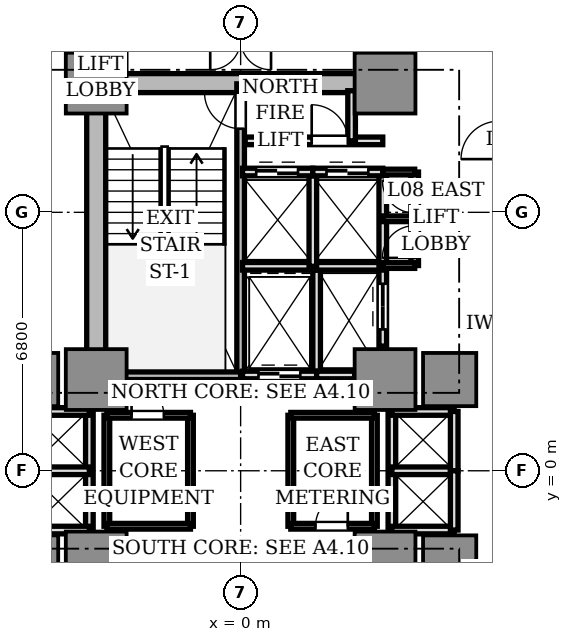
"""IFC4 building model, lengths in metres.
Left out: names, types, materials, properties, quantities, classifications, styles, units other than length and angle.
Written with IfcOpenShell. Run it as: python <this file> out.ifc"""

import sys

from ifc_helpers import new_model, si_unit, direction, frame, frame_2d, origin, origin_2d, place, context, subcontext, project, spatial, rectangle, extrude, source, transform, mapped, element, fill, save


model = new_model("IFC4")
c1 = context("Model", 3, precision=1e-05, world=origin(), true_north=direction((0.0, 1.0)))
c2 = subcontext(c1, "Body", "Model", "MODEL_VIEW")
j1 = project(units=[si_unit("LENGTHUNIT", "METRE"), si_unit("PLANEANGLEUNIT", "RADIAN")], contexts=[c1])
p1 = place(None, origin())
s1 = spatial("IfcSite", under=j1, at=p1, CompositionType="ELEMENT")
p2 = place(p1, origin())
s2 = spatial("IfcBuilding", under=s1, at=p2, CompositionType="ELEMENT")
p3 = place(p2, frame((0.0, 0.0, 33.15)))
s3 = spatial("IfcBuildingStorey", under=s2, at=p3, CompositionType="ELEMENT", Elevation=33.15)
p4 = place(p3, frame((-3.55, 10.2, 0.0), z_axis=(0.0, 0.0, 1.0), x_axis=(1.0, 0.0, 0.0)))
e1 = element("IfcWall", 1, at=p4, inside=s3, PredefinedType="SHEAR", context=c2, shape_type="SweptSolid", body=[
    extrude(rectangle(XDim=7.1, YDim=0.5, at=frame_2d((3.55, 0.0))), origin(), (0.0, 0.0, 1.0), 3.11),
])
p5 = place(p3, frame((-3.8, 2.85, 0.0), z_axis=(0.0, 0.0, 1.0), x_axis=(0.0, 1.0, 0.0)))
e2 = element("IfcWall", 2, at=p5, inside=s3, PredefinedType="SHEAR", context=c2, shape_type="SweptSolid", body=[
    extrude(rectangle(XDim=6.9, YDim=0.5, at=frame_2d((3.45, 0.0))), origin(), (0.0, 0.0, 1.0), 3.11),
])
m1 = source(origin(), c2, "Body", "SweptSolid", [
    extrude(rectangle(XDim=1.6, YDim=1.6, at=origin_2d()), origin(), (0.0, 0.0, 1.0), 3.11),
])
for number, where, z_axis, x_axis in (
    (3, (-3.8, 2.4, 0.0), (0.0, 0.0, 1.0), (1.0, 0.0, 0.0)),
    (4, (3.8, 2.4, 0.0), (0.0, 0.0, 1.0), (1.0, 0.0, 0.0)),
    (5, (-3.8, 10.2, 0.0), (0.0, 0.0, 1.0), (1.0, 0.0, 0.0)),
    (6, (3.8, 10.2, 0.0), (0.0, 0.0, 1.0), (1.0, 0.0, 0.0)),
    (7, (-3.8, -2.4, 0.0), (0.0, 0.0, 1.0), (1.0, 0.0, 0.0)),
    (8, (3.8, -2.4, 0.0), (0.0, 0.0, 1.0), (1.0, 0.0, 0.0)),
):
    element("IfcColumn", number, at=place(p3, frame(where, z_axis=z_axis, x_axis=x_axis)), inside=s3, PredefinedType="COLUMN", context=c2, shape_type="MappedRepresentation", body=[
        mapped(m1, transform((0.0, 0.0, 0.0), scale=1.0)),
    ])
m2 = source(origin(), c2, "Body", "SweptSolid", [
    extrude(rectangle(XDim=1.4, YDim=1.4, at=origin_2d()), origin(), (0.0, 0.0, 1.0), 3.11),
])
for number, where, z_axis, x_axis in (
    (9, (5.5, 2.4, 0.0), (0.0, 0.0, 1.0), (1.0, 0.0, 0.0)),
    (10, (-5.5, 2.4, 0.0), (0.0, 0.0, 1.0), (1.0, 0.0, 0.0)),
    (11, (5.5, -2.4, 0.0), (0.0, 0.0, 1.0), (1.0, 0.0, 0.0)),
    (12, (-5.5, -2.4, 0.0), (0.0, 0.0, 1.0), (1.0, 0.0, 0.0)),
):
    element("IfcColumn", number, at=place(p3, frame(where, z_axis=z_axis, x_axis=x_axis)), inside=s3, PredefinedType="COLUMN", context=c2, shape_type="MappedRepresentation", body=[
        mapped(m2, transform((0.0, 0.0, 0.0), scale=1.0)),
    ])
p6 = place(p3, frame((0.0, 2.5, 0.0), z_axis=(0.0, 0.0, 1.0), x_axis=(0.0, 1.0, 0.0)))
e13 = element("IfcWall", 13, at=p6, inside=s3, PredefinedType="SOLIDWALL", context=c2, shape_type="SweptSolid", body=[
    extrude(rectangle(XDim=7.68, YDim=0.2, at=frame_2d((3.84, 0.0))), origin(), (0.0, 0.0, 1.0), 3.11),
])
p7 = place(p6, frame((6.5, 0.0, 0.0)))
e14 = element("IfcOpeningElement", 14, at=p7, cuts=e13, PredefinedType="OPENING", context=c2, shape_type="SweptSolid", body=[
    extrude(rectangle(XDim=0.95, YDim=2.15, at=frame_2d((0.475, 1.075))), frame((0.0, 0.11, 0.0), z_axis=(0.0, -1.0, 0.0), x_axis=(1.0, 0.0, 0.0)), (0.0, 0.0, 1.0), 0.22),
])
p8 = place(p3, frame((-3.72, 2.5, 0.0), z_axis=(0.0, 0.0, 1.0), x_axis=(1.0, 0.0, 0.0)))
e15 = element("IfcWall", 15, at=p8, inside=s3, PredefinedType="SOLIDWALL", context=c2, shape_type="SweptSolid", body=[
    extrude(rectangle(XDim=3.72, YDim=0.2, at=frame_2d((1.86, 0.0))), origin(), (0.0, 0.0, 1.0), 3.11),
])
p9 = place(p3, frame((2.0, 2.5, 0.0), z_axis=(0.0, 0.0, 1.0), x_axis=(0.0, 1.0, 0.0)))
e16 = element("IfcWall", 16, at=p9, inside=s3, PredefinedType="SOLIDWALL", context=c2, shape_type="SweptSolid", body=[
    extrude(rectangle(XDim=2.78, YDim=0.2, at=frame_2d((1.39, 0.0))), origin(), (0.0, 0.0, 1.0), 2.66),
])
p10 = place(p3, frame((0.05, 2.52, 0.0), z_axis=(0.0, 0.0, 1.0), x_axis=(1.0, 0.0, 0.0)))
e17 = element("IfcWall", 17, at=p10, inside=s3, PredefinedType="SOLIDWALL", context=c2, shape_type="SweptSolid", body=[
    extrude(rectangle(XDim=1.95, YDim=0.2, at=frame_2d((0.975, 0.0))), origin(), (0.0, 0.0, 1.0), 2.66),
])
p11 = place(p10, frame((0.42, 0.0, 0.0)))
e18 = element("IfcOpeningElement", 18, at=p11, cuts=e17, PredefinedType="OPENING", context=c2, shape_type="SweptSolid", body=[
    extrude(rectangle(XDim=1.1, YDim=2.2, at=frame_2d((0.55, 1.1))), frame((0.0, 0.11, 0.0), z_axis=(0.0, -1.0, 0.0), x_axis=(1.0, 0.0, 0.0)), (0.0, 0.0, 1.0), 0.22),
])
p12 = place(p3, frame((2.0, 2.52, 0.0), z_axis=(0.0, 0.0, 1.0), x_axis=(1.0, 0.0, 0.0)))
e19 = element("IfcWall", 19, at=p12, inside=s3, PredefinedType="SOLIDWALL", context=c2, shape_type="SweptSolid", body=[
    extrude(rectangle(XDim=1.0, YDim=0.2, at=frame_2d((0.5, 0.0))), origin(), (0.0, 0.0, 1.0), 2.66),
])
p13 = place(p3, frame((3.74, 3.28, 0.0), z_axis=(0.0, 0.0, 1.0), x_axis=(0.0, 1.0, 0.0)))
e20 = element("IfcWall", 20, at=p13, inside=s3, PredefinedType="SOLIDWALL", context=c2, shape_type="SweptSolid", body=[
    extrude(rectangle(XDim=2.08, YDim=0.2, at=frame_2d((1.04, 0.0))), origin(), (0.0, 0.0, 1.0), 2.66),
])
p14 = place(p13, frame((0.44, 0.0, 0.0)))
e21 = element("IfcOpeningElement", 21, at=p14, cuts=e20, PredefinedType="OPENING", context=c2, shape_type="SweptSolid", body=[
    extrude(rectangle(XDim=1.2, YDim=2.2, at=frame_2d((0.6, 1.1))), frame((0.0, 0.11, 0.0), z_axis=(0.0, -1.0, 0.0), x_axis=(1.0, 0.0, 0.0)), (0.0, 0.0, 1.0), 0.22),
])
p15 = place(p3, frame((0.05, 5.38, 0.0), z_axis=(0.0, 0.0, 1.0), x_axis=(1.0, 0.0, 0.0)))
e22 = element("IfcWall", 22, at=p15, inside=s3, PredefinedType="SOLIDWALL", context=c2, shape_type="SweptSolid", body=[
    extrude(rectangle(XDim=3.69, YDim=0.2, at=frame_2d((1.845, 0.0))), origin(), (0.0, 0.0, 1.0), 2.66),
])
p16 = place(p3, frame((1.9, 5.38, 0.0), z_axis=(0.0, 0.0, 1.0), x_axis=(0.0, 1.0, 0.0)))
e23 = element("IfcWall", 23, at=p16, inside=s3, PredefinedType="SOLIDWALL", context=c2, shape_type="SweptSolid", body=[
    extrude(rectangle(XDim=2.48, YDim=0.2, at=frame_2d((1.24, 0.0))), origin(), (0.0, 0.0, 1.0), 2.66),
])
p17 = place(p3, frame((0.05, 7.86, 0.0), z_axis=(0.0, 0.0, 1.0), x_axis=(1.0, 0.0, 0.0)))
e24 = element("IfcWall", 24, at=p17, inside=s3, PredefinedType="SOLIDWALL", context=c2, shape_type="SweptSolid", body=[
    extrude(rectangle(XDim=1.85, YDim=0.2, at=frame_2d((0.925, 0.0))), origin(), (0.0, 0.0, 1.0), 2.66),
])
p18 = place(p17, frame((0.36, 0.0, 0.0)))
e25 = element("IfcOpeningElement", 25, at=p18, cuts=e24, PredefinedType="OPENING", context=c2, shape_type="SweptSolid", body=[
    extrude(rectangle(XDim=1.1, YDim=2.2, at=frame_2d((0.55, 1.1))), frame((0.0, 0.11, 0.0), z_axis=(0.0, -1.0, 0.0), x_axis=(1.0, 0.0, 0.0)), (0.0, 0.0, 1.0), 0.22),
])
p19 = place(p3, frame((3.74, 5.38, 0.0), z_axis=(0.0, 0.0, 1.0), x_axis=(0.0, 1.0, 0.0)))
e26 = element("IfcWall", 26, at=p19, inside=s3, PredefinedType="SOLIDWALL", context=c2, shape_type="SweptSolid", body=[
    extrude(rectangle(XDim=2.48, YDim=0.2, at=frame_2d((1.24, 0.0))), origin(), (0.0, 0.0, 1.0), 2.66),
])
p20 = place(p3, frame((1.9, 7.86, 0.0), z_axis=(0.0, 0.0, 1.0), x_axis=(1.0, 0.0, 0.0)))
e27 = element("IfcWall", 27, at=p20, inside=s3, PredefinedType="SOLIDWALL", context=c2, shape_type="SweptSolid", body=[
    extrude(rectangle(XDim=1.84, YDim=0.2, at=frame_2d((0.92, 0.0))), origin(), (0.0, 0.0, 1.0), 2.66),
])
p21 = place(p20, frame((0.36, 0.0, 0.0)))
e28 = element("IfcOpeningElement", 28, at=p21, cuts=e27, PredefinedType="OPENING", context=c2, shape_type="SweptSolid", body=[
    extrude(rectangle(XDim=1.1, YDim=2.2, at=frame_2d((0.55, 1.1))), frame((0.0, 0.11, 0.0), z_axis=(0.0, -1.0, 0.0), x_axis=(1.0, 0.0, 0.0)), (0.0, 0.0, 1.0), 0.22),
])
p22 = place(p3, frame((3.98, -1.56, 0.0), z_axis=(0.0, 0.0, 1.0), x_axis=(0.0, 1.0, 0.0)))
e29 = element("IfcWall", 29, at=p22, inside=s3, PredefinedType="SOLIDWALL", context=c2, shape_type="SweptSolid", body=[
    extrude(rectangle(XDim=3.12, YDim=0.2, at=frame_2d((1.56, 0.0))), origin(), (0.0, 0.0, 1.0), 2.18),
])
for number, where, z_axis, x_axis in (
    (30, (3.98, 1.56, 0.0), (0.0, 0.0, 1.0), (1.0, 0.0, 0.0)),
    (31, (3.98, -1.56, 0.0), (0.0, 0.0, 1.0), (1.0, 0.0, 0.0)),
    (32, (3.98, 0.0, 0.0), (0.0, 0.0, 1.0), (1.0, 0.0, 0.0)),
):
    element("IfcWall", number, at=place(p3, frame(where, z_axis=z_axis, x_axis=x_axis)), inside=s3, PredefinedType="SOLIDWALL", context=c2, shape_type="SweptSolid", body=[
        extrude(rectangle(XDim=1.64, YDim=0.2, at=frame_2d((0.82, 0.0))), origin(), (0.0, 0.0, 1.0), 2.66),
    ])
for number, where, z_axis, x_axis in (
    (33, (5.62, 0.0, 0.0), (0.0, 0.0, 1.0), (0.0, 1.0, 0.0)),
    (34, (5.62, -1.56, 0.0), (0.0, 0.0, 1.0), (0.0, 1.0, 0.0)),
):
    element("IfcWall", number, at=place(p3, frame(where, z_axis=z_axis, x_axis=x_axis)), inside=s3, PredefinedType="SOLIDWALL", context=c2, shape_type="SweptSolid", body=[
        extrude(rectangle(XDim=1.56, YDim=0.2, at=frame_2d((0.78, 0.0))), origin(), (0.0, 0.0, 1.0), 2.66),
    ])
p23 = place(p3, frame((-3.98, -1.56, 0.0), z_axis=(0.0, 0.0, 1.0), x_axis=(0.0, 1.0, 0.0)))
e35 = element("IfcWall", 35, at=p23, inside=s3, PredefinedType="SOLIDWALL", context=c2, shape_type="SweptSolid", body=[
    extrude(rectangle(XDim=3.12, YDim=0.2, at=frame_2d((1.56, 0.0))), origin(), (0.0, 0.0, 1.0), 2.18),
])
for number, where, z_axis, x_axis in (
    (36, (-5.62, 1.56, 0.0), (0.0, 0.0, 1.0), (1.0, 0.0, 0.0)),
    (37, (-5.62, -1.56, 0.0), (0.0, 0.0, 1.0), (1.0, 0.0, 0.0)),
    (38, (-5.62, 0.0, 0.0), (0.0, 0.0, 1.0), (1.0, 0.0, 0.0)),
):
    element("IfcWall", number, at=place(p3, frame(where, z_axis=z_axis, x_axis=x_axis)), inside=s3, PredefinedType="SOLIDWALL", context=c2, shape_type="SweptSolid", body=[
        extrude(rectangle(XDim=1.64, YDim=0.2, at=frame_2d((0.82, 0.0))), origin(), (0.0, 0.0, 1.0), 2.66),
    ])
p24 = place(p3, frame((0.12, 8.68, 0.0), z_axis=(0.0, 0.0, 1.0), x_axis=(1.0, 0.0, 0.0)))
e39 = element("IfcWall", 39, at=p24, inside=s3, PredefinedType="SOLIDWALL", context=c2, shape_type="SweptSolid", body=[
    extrude(rectangle(XDim=3.62, YDim=0.2, at=frame_2d((1.81, 0.0))), origin(), (0.0, 0.0, 1.0), 2.66),
])
p25 = place(p24, frame((1.75, 0.0, 0.0)))
e40 = element("IfcOpeningElement", 40, at=p25, cuts=e39, PredefinedType="OPENING", context=c2, shape_type="SweptSolid", body=[
    extrude(rectangle(XDim=0.95, YDim=2.15, at=frame_2d((0.475, 1.075))), frame((0.0, 0.11, 0.0), z_axis=(0.0, -1.0, 0.0), x_axis=(1.0, 0.0, 0.0)), (0.0, 0.0, 1.0), 0.22),
])
p26 = place(p3, frame((2.92, 8.68, 0.0), z_axis=(0.0, 0.0, 1.0), x_axis=(0.0, 1.0, 0.0)))
e41 = element("IfcWall", 41, at=p26, inside=s3, PredefinedType="SOLIDWALL", context=c2, shape_type="SweptSolid", body=[
    extrude(rectangle(XDim=1.32, YDim=0.2, at=frame_2d((0.66, 0.0))), origin(), (0.0, 0.0, 1.0), 2.66),
])
p27 = place(p3, frame((4.58, 5.4, 0.0), z_axis=(0.0, 0.0, 1.0), x_axis=(0.0, 1.0, 0.0)))
e42 = element("IfcWall", 42, at=p27, inside=s3, PredefinedType="SOLIDWALL", context=c2, shape_type="SweptSolid", body=[
    extrude(rectangle(XDim=2.46, YDim=0.2, at=frame_2d((1.23, 0.0))), origin(), (0.0, 0.0, 1.0), 2.66),
])
p28 = place(p27, frame((0.2, 0.0, 0.0)))
e43 = element("IfcOpeningElement", 43, at=p28, cuts=e42, PredefinedType="OPENING", context=c2, shape_type="SweptSolid", body=[
    extrude(rectangle(XDim=0.85, YDim=2.1, at=frame_2d((0.425, 1.05))), frame((0.0, 0.11, 0.0), z_axis=(0.0, -1.0, 0.0), x_axis=(1.0, 0.0, 0.0)), (0.0, 0.0, 1.0), 0.22),
])
p29 = place(p27, frame((1.38, 0.0, 0.0)))
e44 = element("IfcOpeningElement", 44, at=p29, cuts=e42, PredefinedType="OPENING", context=c2, shape_type="SweptSolid", body=[
    extrude(rectangle(XDim=0.85, YDim=2.1, at=frame_2d((0.425, 1.05))), frame((0.0, 0.11, 0.0), z_axis=(0.0, -1.0, 0.0), x_axis=(1.0, 0.0, 0.0)), (0.0, 0.0, 1.0), 0.22),
])
for number, where, z_axis, x_axis in (
    (45, (3.74, 5.4, 0.0), (0.0, 0.0, 1.0), (1.0, 0.0, 0.0)),
    (46, (3.74, 7.86, 0.0), (0.0, 0.0, 1.0), (1.0, 0.0, 0.0)),
    (47, (3.74, 6.63, 0.0), (0.0, 0.0, 1.0), (1.0, 0.0, 0.0)),
):
    element("IfcWall", number, at=place(p3, frame(where, z_axis=z_axis, x_axis=x_axis)), inside=s3, PredefinedType="PARTITIONING", context=c2, shape_type="SweptSolid", body=[
        extrude(rectangle(XDim=0.84, YDim=0.15, at=frame_2d((0.42, 0.0))), origin(), (0.0, 0.0, 1.0), 2.66),
    ])
p30 = place(p3, frame((-1.32, -1.46, 0.0), z_axis=(0.0, 0.0, 1.0), x_axis=(0.0, 1.0, 0.0)))
e48 = element("IfcWall", 48, at=p30, inside=s3, PredefinedType="PARTITIONING", context=c2, shape_type="SweptSolid", body=[
    extrude(rectangle(XDim=2.92, YDim=0.15, at=frame_2d((1.46, 0.0))), origin(), (0.0, 0.0, 1.0), 2.66),
])
p31 = place(p3, frame((-3.52, -1.46, 0.0), z_axis=(0.0, 0.0, 1.0), x_axis=(0.0, 1.0, 0.0)))
e49 = element("IfcWall", 49, at=p31, inside=s3, PredefinedType="PARTITIONING", context=c2, shape_type="SweptSolid", body=[
    extrude(rectangle(XDim=2.92, YDim=0.15, at=frame_2d((1.46, 0.0))), origin(), (0.0, 0.0, 1.0), 2.18),
])
p32 = place(p3, frame((-3.52, 1.46, 0.0), z_axis=(0.0, 0.0, 1.0), x_axis=(1.0, 0.0, 0.0)))
e50 = element("IfcWall", 50, at=p32, inside=s3, PredefinedType="PARTITIONING", context=c2, shape_type="SweptSolid", body=[
    extrude(rectangle(XDim=2.2, YDim=0.15, at=frame_2d((1.1, 0.0))), origin(), (0.0, 0.0, 1.0), 2.66),
])
p33 = place(p32, frame((0.65, 0.0, 0.0)))
e51 = element("IfcOpeningElement", 51, at=p33, cuts=e50, PredefinedType="OPENING", context=c2, shape_type="SweptSolid", body=[
    extrude(rectangle(XDim=0.85, YDim=2.1, at=frame_2d((0.425, 1.05))), frame((0.0, 0.085, 0.0), z_axis=(0.0, -1.0, 0.0), x_axis=(1.0, 0.0, 0.0)), (0.0, 0.0, 1.0), 0.17),
])
p34 = place(p3, frame((-3.52, -1.46, 0.0), z_axis=(0.0, 0.0, 1.0), x_axis=(1.0, 0.0, 0.0)))
e52 = element("IfcWall", 52, at=p34, inside=s3, PredefinedType="PARTITIONING", context=c2, shape_type="SweptSolid", body=[
    extrude(rectangle(XDim=2.2, YDim=0.15, at=frame_2d((1.1, 0.0))), origin(), (0.0, 0.0, 1.0), 2.66),
])
p35 = place(p3, frame((1.32, -1.46, 0.0), z_axis=(0.0, 0.0, 1.0), x_axis=(0.0, 1.0, 0.0)))
e53 = element("IfcWall", 53, at=p35, inside=s3, PredefinedType="PARTITIONING", context=c2, shape_type="SweptSolid", body=[
    extrude(rectangle(XDim=2.92, YDim=0.15, at=frame_2d((1.46, 0.0))), origin(), (0.0, 0.0, 1.0), 2.66),
])
p36 = place(p3, frame((3.52, -1.46, 0.0), z_axis=(0.0, 0.0, 1.0), x_axis=(0.0, 1.0, 0.0)))
e54 = element("IfcWall", 54, at=p36, inside=s3, PredefinedType="PARTITIONING", context=c2, shape_type="SweptSolid", body=[
    extrude(rectangle(XDim=2.92, YDim=0.15, at=frame_2d((1.46, 0.0))), origin(), (0.0, 0.0, 1.0), 2.18),
])
p37 = place(p3, frame((1.32, 1.46, 0.0), z_axis=(0.0, 0.0, 1.0), x_axis=(1.0, 0.0, 0.0)))
e55 = element("IfcWall", 55, at=p37, inside=s3, PredefinedType="PARTITIONING", context=c2, shape_type="SweptSolid", body=[
    extrude(rectangle(XDim=2.2, YDim=0.15, at=frame_2d((1.1, 0.0))), origin(), (0.0, 0.0, 1.0), 2.66),
])
p38 = place(p3, frame((1.32, -1.46, 0.0), z_axis=(0.0, 0.0, 1.0), x_axis=(1.0, 0.0, 0.0)))
e56 = element("IfcWall", 56, at=p38, inside=s3, PredefinedType="PARTITIONING", context=c2, shape_type="SweptSolid", body=[
    extrude(rectangle(XDim=2.2, YDim=0.15, at=frame_2d((1.1, 0.0))), origin(), (0.0, 0.0, 1.0), 2.66),
])
p39 = place(p38, frame((0.65, 0.0, 0.0)))
e57 = element("IfcOpeningElement", 57, at=p39, cuts=e56, PredefinedType="OPENING", context=c2, shape_type="SweptSolid", body=[
    extrude(rectangle(XDim=0.85, YDim=2.1, at=frame_2d((0.425, 1.05))), frame((0.0, 0.085, 0.0), z_axis=(0.0, -1.0, 0.0), x_axis=(1.0, 0.0, 0.0)), (0.0, 0.0, 1.0), 0.17),
])
m3 = source(origin(), c2, "Body", "SweptSolid", [
    extrude(rectangle(XDim=1.1, YDim=0.05, at=origin_2d()), origin(), (0.0, 0.0, 1.0), 2.2),
])
p40 = place(p11, frame((0.55, 0.0, 0.0)))
e58 = element("IfcDoor", 58, at=p40, inside=s3, OperationType="DOUBLE_DOOR_SLIDING", PredefinedType="DOOR", context=c2, shape_type="MappedRepresentation", body=[
    mapped(m3, transform((0.0, 0.0, 0.0), scale=1.0)),
])
fill(e18, e58)
m4 = source(origin(), c2, "Body", "SweptSolid", [
    extrude(rectangle(XDim=1.2, YDim=0.05, at=origin_2d()), origin(), (0.0, 0.0, 1.0), 2.2),
])
p41 = place(p14, frame((0.6, 0.0, 0.0)))
e59 = element("IfcDoor", 59, at=p41, inside=s3, OperationType="DOUBLE_DOOR_SLIDING", PredefinedType="DOOR", context=c2, shape_type="MappedRepresentation", body=[
    mapped(m4, transform((0.0, 0.0, 0.0), scale=1.0)),
])
fill(e21, e59)
p42 = place(p18, frame((0.55, 0.0, 0.0)))
e60 = element("IfcDoor", 60, at=p42, inside=s3, OperationType="DOUBLE_DOOR_SLIDING", PredefinedType="DOOR", context=c2, shape_type="MappedRepresentation", body=[
    mapped(m3, transform((0.0, 0.0, 0.0), scale=1.0)),
])
fill(e25, e60)
p43 = place(p21, frame((0.55, 0.0, 0.0)))
e61 = element("IfcDoor", 61, at=p43, inside=s3, OperationType="DOUBLE_DOOR_SLIDING", PredefinedType="DOOR", context=c2, shape_type="MappedRepresentation", body=[
    mapped(m3, transform((0.0, 0.0, 0.0), scale=1.0)),
])
fill(e28, e61)
m5 = source(origin(), c2, "Body", "SweptSolid", [
    extrude(rectangle(XDim=0.95, YDim=0.05, at=origin_2d()), origin(), (0.0, 0.0, 1.0), 2.15),
])
p44 = place(p7, frame((0.475, 0.0, 0.0)))
e62 = element("IfcDoor", 62, at=p44, inside=s3, OperationType="SINGLE_SWING_RIGHT", PredefinedType="DOOR", context=c2, shape_type="MappedRepresentation", body=[
    mapped(m5, transform((0.0, 0.0, 0.0), scale=1.0)),
])
fill(e14, e62)
p45 = place(p25, frame((0.475, 0.0, 0.0)))
e63 = element("IfcDoor", 63, at=p45, inside=s3, OperationType="SINGLE_SWING_LEFT", PredefinedType="DOOR", context=c2, shape_type="MappedRepresentation", body=[
    mapped(m5, transform((0.0, 0.0, 0.0), scale=1.0)),
])
fill(e40, e63)
m6 = source(origin(), c2, "Body", "SweptSolid", [
    extrude(rectangle(XDim=0.85, YDim=0.05, at=origin_2d()), origin(), (0.0, 0.0, 1.0), 2.1),
])
p46 = place(p28, frame((0.425, 0.0, 0.0)))
e64 = element("IfcDoor", 64, at=p46, inside=s3, OperationType="SINGLE_SWING_LEFT", PredefinedType="DOOR", context=c2, shape_type="MappedRepresentation", body=[
    mapped(m6, transform((0.0, 0.0, 0.0), scale=1.0)),
])
fill(e43, e64)
p47 = place(p29, frame((0.425, 0.0, 0.0)))
e65 = element("IfcDoor", 65, at=p47, inside=s3, OperationType="SINGLE_SWING_RIGHT", PredefinedType="DOOR", context=c2, shape_type="MappedRepresentation", body=[
    mapped(m6, transform((0.0, 0.0, 0.0), scale=1.0)),
])
fill(e44, e65)
p48 = place(p33, frame((0.425, 0.0, 0.0)))
e66 = element("IfcDoor", 66, at=p48, inside=s3, OperationType="SINGLE_SWING_LEFT", PredefinedType="DOOR", context=c2, shape_type="MappedRepresentation", body=[
    mapped(m6, transform((0.0, 0.0, 0.0), scale=1.0)),
])
fill(e51, e66)
p49 = place(p39, frame((0.425, 0.0, 0.0)))
e67 = element("IfcDoor", 67, at=p49, inside=s3, OperationType="SINGLE_SWING_RIGHT", PredefinedType="DOOR", context=c2, shape_type="MappedRepresentation", body=[
    mapped(m6, transform((0.0, 0.0, 0.0), scale=1.0)),
])
fill(e57, e67)
save(model, sys.argv[1])
